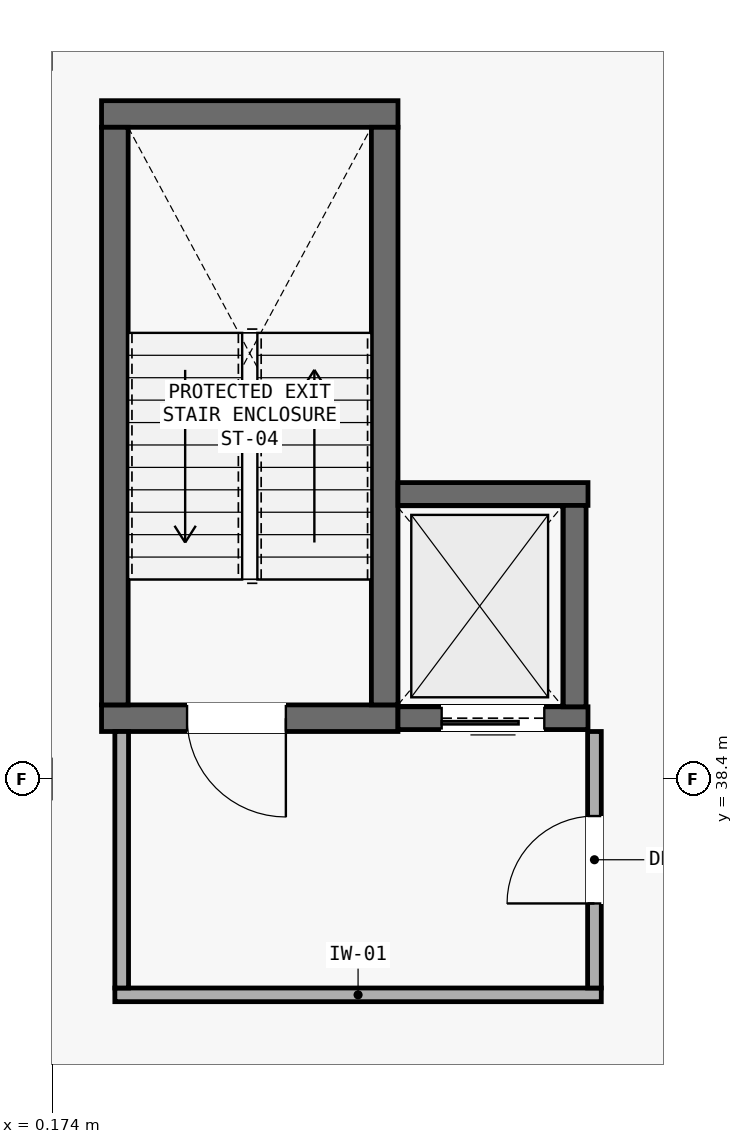
"""IFC4 building model, lengths in metres.
Left out: names, types, materials, properties, quantities, classifications, styles, units other than length and angle.
Written with IfcOpenShell. Run it as: python <this file> out.ifc"""

import sys

from ifc_helpers import new_model, si_unit, direction, frame, frame_2d, origin, place, context, subcontext, project, spatial, rectangle, extrude, element, fill, save


model = new_model("IFC4")
c1 = context("Model", 3, precision=1e-05, world=origin(), true_north=direction((0.0, 1.0)))
c2 = subcontext(c1, "Body", "Model", "MODEL_VIEW")
j1 = project(units=[si_unit("LENGTHUNIT", "METRE"), si_unit("PLANEANGLEUNIT", "RADIAN")], contexts=[c1])
p1 = place(None, origin())
s1 = spatial("IfcSite", under=j1, at=p1, CompositionType="ELEMENT")
p2 = place(p1, origin())
s2 = spatial("IfcBuilding", under=s1, at=p2, CompositionType="ELEMENT")
p3 = place(p2, frame((0.0, 0.0, 9.45)))
s3 = spatial("IfcBuildingStorey", under=s2, at=p3, CompositionType="ELEMENT", Elevation=9.45)
p4 = place(p3, frame((0.825, 39.2, 0.0), z_axis=(0.0, 0.0, 1.0), x_axis=(1.0, 0.0, 0.0)))
e1 = element("IfcWall", 1, at=p4, inside=s3, PredefinedType="SHEAR", context=c2, shape_type="SweptSolid", body=[
    extrude(rectangle(XDim=3.9, YDim=0.35, at=frame_2d((1.95, 0.0))), origin(), (0.0, 0.0, 1.0), 3.97),
])
p5 = place(p4, frame((1.125, 0.0, 0.0)))
e2 = element("IfcOpeningElement", 2, at=p5, cuts=e1, PredefinedType="OPENING", context=c2, shape_type="SweptSolid", body=[
    extrude(rectangle(XDim=1.3, YDim=2.15, at=frame_2d((0.65, 1.075))), frame((0.0, 0.185, 0.0), z_axis=(0.0, -1.0, 0.0), x_axis=(1.0, 0.0, 0.0)), (0.0, 0.0, 1.0), 0.37),
])
p6 = place(p3, frame((0.825, 47.15, 0.0), z_axis=(0.0, 0.0, 1.0), x_axis=(1.0, 0.0, 0.0)))
e3 = element("IfcWall", 3, at=p6, inside=s3, PredefinedType="SHEAR", context=c2, shape_type="SweptSolid", body=[
    extrude(rectangle(XDim=3.9, YDim=0.35, at=frame_2d((1.95, 0.0))), origin(), (0.0, 0.0, 1.0), 3.97),
])
for number, where, z_axis, x_axis in (
    (4, (1.0, 39.375, 0.0), (0.0, 0.0, 1.0), (0.0, 1.0, 0.0)),
    (5, (4.55, 39.375, 0.0), (0.0, 0.0, 1.0), (0.0, 1.0, 0.0)),
):
    element("IfcWall", number, at=place(p3, frame(where, z_axis=z_axis, x_axis=x_axis)), inside=s3, PredefinedType="SHEAR", context=c2, shape_type="SweptSolid", body=[
        extrude(rectangle(XDim=7.6, YDim=0.35, at=frame_2d((3.8, 0.0))), origin(), (0.0, 0.0, 1.0), 3.97),
    ])
p7 = place(p3, frame((4.725, 39.2, 0.0), z_axis=(0.0, 0.0, 1.0), x_axis=(1.0, 0.0, 0.0)))
e6 = element("IfcWall", 6, at=p7, inside=s3, PredefinedType="SHEAR", context=c2, shape_type="SweptSolid", body=[
    extrude(rectangle(XDim=2.5, YDim=0.3, at=frame_2d((1.25, 0.0))), origin(), (0.0, 0.0, 1.0), 3.97),
])
p8 = place(p7, frame((0.575, 0.0, 0.0)))
e7 = element("IfcOpeningElement", 7, at=p8, cuts=e6, PredefinedType="OPENING", context=c2, shape_type="SweptSolid", body=[
    extrude(rectangle(XDim=1.35, YDim=2.15, at=frame_2d((0.675, 1.075))), frame((0.0, 0.16, 0.0), z_axis=(0.0, -1.0, 0.0), x_axis=(1.0, 0.0, 0.0)), (0.0, 0.0, 1.0), 0.32),
])
p9 = place(p3, frame((4.725, 42.15, 0.0), z_axis=(0.0, 0.0, 1.0), x_axis=(1.0, 0.0, 0.0)))
e8 = element("IfcWall", 8, at=p9, inside=s3, PredefinedType="SHEAR", context=c2, shape_type="SweptSolid", body=[
    extrude(rectangle(XDim=2.5, YDim=0.3, at=frame_2d((1.25, 0.0))), origin(), (0.0, 0.0, 1.0), 3.97),
])
p10 = place(p3, frame((7.05, 39.35, 0.0), z_axis=(0.0, 0.0, 1.0), x_axis=(0.0, 1.0, 0.0)))
e9 = element("IfcWall", 9, at=p10, inside=s3, PredefinedType="SHEAR", context=c2, shape_type="SweptSolid", body=[
    extrude(rectangle(XDim=2.65, YDim=0.3, at=frame_2d((1.325, 0.0))), origin(), (0.0, 0.0, 1.0), 3.97),
])
p11 = place(p3, frame((1.0, 35.56, 0.0), z_axis=(0.0, 0.0, 1.0), x_axis=(1.0, 0.0, 0.0)))
e10 = element("IfcWall", 10, at=p11, inside=s3, PredefinedType="PARTITIONING", context=c2, shape_type="SweptSolid", body=[
    extrude(rectangle(XDim=6.4, YDim=0.18, at=frame_2d((3.2, 0.0))), origin(), (0.0, 0.0, 1.0), 3.97),
])
p12 = place(p3, frame((1.09, 35.65, 0.0), z_axis=(0.0, 0.0, 1.0), x_axis=(0.0, 1.0, 0.0)))
e11 = element("IfcWall", 11, at=p12, inside=s3, PredefinedType="PARTITIONING", context=c2, shape_type="SweptSolid", body=[
    extrude(rectangle(XDim=3.375, YDim=0.18, at=frame_2d((1.688, 0.0))), origin(), (0.0, 0.0, 1.0), 3.97),
])
p13 = place(p3, frame((7.31, 35.65, 0.0), z_axis=(0.0, 0.0, 1.0), x_axis=(0.0, 1.0, 0.0)))
e12 = element("IfcWall", 12, at=p13, inside=s3, PredefinedType="PARTITIONING", context=c2, shape_type="SweptSolid", body=[
    extrude(rectangle(XDim=3.375, YDim=0.18, at=frame_2d((1.688, 0.0))), origin(), (0.0, 0.0, 1.0), 3.97),
])
p14 = place(p13, frame((1.113, 0.0, 0.0)))
e13 = element("IfcOpeningElement", 13, at=p14, cuts=e12, PredefinedType="OPENING", context=c2, shape_type="SweptSolid", body=[
    extrude(rectangle(XDim=1.15, YDim=2.15, at=frame_2d((0.575, 1.075))), frame((0.0, 0.1, 0.0), z_axis=(0.0, -1.0, 0.0), x_axis=(1.0, 0.0, 0.0)), (0.0, 0.0, 1.0), 0.2),
])
p15 = place(p5, frame((1.3, 0.0, 0.0), z_axis=(0.0, 0.0, 1.0), x_axis=(-1.0, 0.0, 0.0)))
e14 = element("IfcDoor", 14, at=p15, inside=s3, OperationType="SINGLE_SWING_RIGHT", PredefinedType="DOOR", context=c2, shape_type="SweptSolid", body=[
    extrude(rectangle(XDim=1.3, YDim=2.15, at=frame_2d((0.65, 1.075))), frame((0.0, 0.025, 0.0), z_axis=(0.0, -1.0, 0.0), x_axis=(1.0, 0.0, 0.0)), (0.0, 0.0, 1.0), 0.05),
])
fill(e2, e14)
p16 = place(p8, frame((1.35, 0.0, 0.0), z_axis=(0.0, 0.0, 1.0), x_axis=(-1.0, 0.0, 0.0)))
e15 = element("IfcDoor", 15, at=p16, inside=s3, OperationType="SLIDING_TO_RIGHT", PredefinedType="DOOR", context=c2, shape_type="SweptSolid", body=[
    extrude(rectangle(XDim=1.35, YDim=2.15, at=frame_2d((0.675, 1.075))), frame((0.0, 0.025, 0.0), z_axis=(0.0, -1.0, 0.0), x_axis=(1.0, 0.0, 0.0)), (0.0, 0.0, 1.0), 0.05),
])
fill(e7, e15)
p17 = place(p14, origin())
e16 = element("IfcDoor", 16, at=p17, inside=s3, OperationType="SINGLE_SWING_LEFT", PredefinedType="DOOR", context=c2, shape_type="SweptSolid", body=[
    extrude(rectangle(XDim=1.15, YDim=2.15, at=frame_2d((0.575, 1.075))), frame((0.0, 0.025, 0.0), z_axis=(0.0, -1.0, 0.0), x_axis=(1.0, 0.0, 0.0)), (0.0, 0.0, 1.0), 0.05),
])
fill(e13, e16)
save(model, sys.argv[1])
